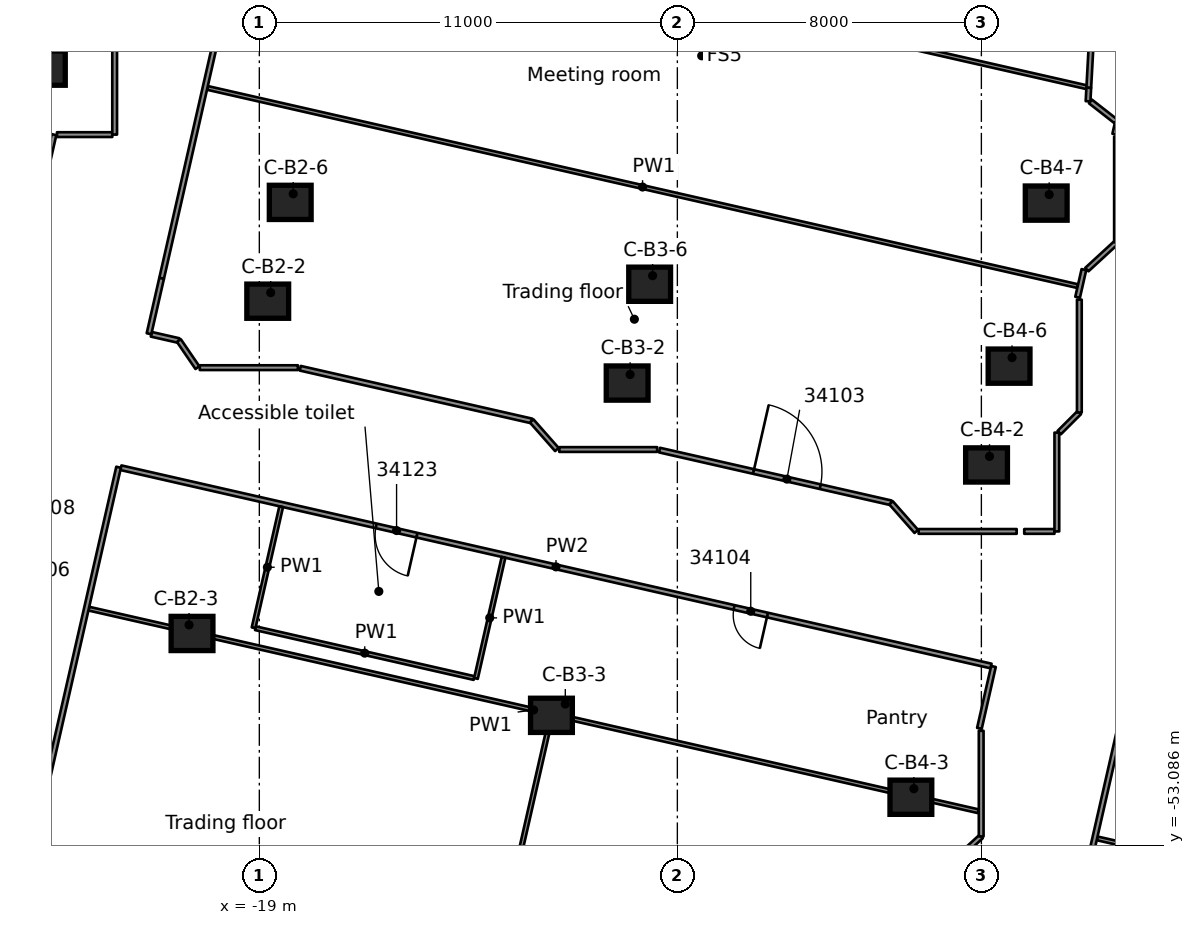
"""IFC4 building model, lengths in metres.
Left out: names, types, materials, properties, quantities, classifications, styles, units other than length and angle.
Written with IfcOpenShell. Run it as: python <this file> out.ifc"""

import sys

from ifc_helpers import new_model, si_unit, direction, frame, frame_2d, origin, origin_2d, place, context, subcontext, project, spatial, rectangle, extrude, element, fill, save


model = new_model("IFC4")
c1 = context("Model", 3, precision=1e-05, world=origin(), true_north=direction((0.0, 1.0)))
c2 = subcontext(c1, "Body", "Model", "MODEL_VIEW")
j1 = project(units=[si_unit("LENGTHUNIT", "METRE"), si_unit("PLANEANGLEUNIT", "RADIAN")], contexts=[c1])
p1 = place(None, origin())
s1 = spatial("IfcSite", under=j1, at=p1, CompositionType="ELEMENT")
p2 = place(p1, origin())
s2 = spatial("IfcBuilding", under=s1, at=p2, CompositionType="ELEMENT")
p3 = place(p2, frame((0.0, 0.0, 167.1)))
s3 = spatial("IfcBuildingStorey", under=s2, at=p3, CompositionType="ELEMENT", Elevation=167.1)
for number, where, z_axis, x_axis in (
    (1, (-24.657, -32.632, 0.0), (0.0, 0.0, 1.0), (1.0, 0.0, 0.0)),
    (2, (-18.779, -38.764, 0.0), (0.0, 0.0, 1.0), (1.0, 0.0, 0.0)),
    (3, (-20.771, -47.507, 0.0), (0.0, 0.0, 1.0), (1.0, 0.0, 0.0)),
    (4, (-18.187, -36.164, 0.0), (0.0, 0.0, 1.0), (1.0, 0.0, 0.0)),
    (5, (-9.321, -40.918, 0.0), (0.0, 0.0, 1.0), (1.0, 0.0, 0.0)),
    (6, (-11.313, -49.661, 0.0), (0.0, 0.0, 1.0), (1.0, 0.0, 0.0)),
    (7, (-8.729, -38.318, 0.0), (0.0, 0.0, 1.0), (1.0, 0.0, 0.0)),
    (8, (0.136, -43.073, 0.0), (0.0, 0.0, 1.0), (1.0, 0.0, 0.0)),
    (9, (-1.855, -51.816, 0.0), (0.0, 0.0, 1.0), (1.0, 0.0, 0.0)),
    (10, (0.729, -40.473, 0.0), (0.0, 0.0, 1.0), (1.0, 0.0, 0.0)),
    (11, (1.706, -36.183, 0.0), (0.0, 0.0, 1.0), (1.0, 0.0, 0.0)),
):
    element("IfcColumn", number, at=place(p3, frame(where, z_axis=z_axis, x_axis=x_axis)), inside=s3, PredefinedType="COLUMN", context=c2, shape_type="SweptSolid", body=[
        extrude(rectangle(XDim=1.1, YDim=0.9, at=origin_2d()), origin(), (0.0, 0.0, 1.0), 3.5),
    ])
p4 = place(p3, frame((-23.487, -46.854, 0.0), z_axis=(0.0, 0.0, 1.0), x_axis=(0.975033161008, -0.222059304997, 0.0)))
e12 = element("IfcWall", 12, at=p4, inside=s3, PredefinedType="PARTITIONING", context=c2, shape_type="SweptSolid", body=[
    extrude(rectangle(XDim=24.007, YDim=0.1, at=frame_2d((12.004, 0.0))), origin(), (0.0, 0.0, 1.0), 3.06),
])
p5 = place(p3, frame((3.046, -52.898, 0.0), z_axis=(0.0, 0.0, 1.0), x_axis=(0.975003485187, -0.222189567426, 0.0)))
e13 = element("IfcWall", 13, at=p5, inside=s3, PredefinedType="PARTITIONING", context=c2, shape_type="SweptSolid", body=[
    extrude(rectangle(XDim=5.531, YDim=0.1, at=frame_2d((2.766, 0.0))), origin(), (0.0, 0.0, 1.0), 3.06),
])
p6 = place(p3, frame((-19.102, -47.369, 0.0), z_axis=(0.0, 0.0, 1.0), x_axis=(0.974994450255, -0.222229210436, 0.0)))
e14 = element("IfcWall", 14, at=p6, inside=s3, PredefinedType="PARTITIONING", context=c2, shape_type="SweptSolid", body=[
    extrude(rectangle(XDim=5.899, YDim=0.1, at=frame_2d((2.95, 0.0))), origin(), (0.0, 0.0, 1.0), 3.06),
])
p7 = place(p3, frame((0.255, -48.363, 0.0), z_axis=(0.0, 0.0, 1.0), x_axis=(-0.975011387461, 0.222154888135, 0.0)))
e15 = element("IfcWall", 15, at=p7, inside=s3, PredefinedType="PARTITIONING", context=c2, shape_type="SweptSolid", body=[
    extrude(rectangle(XDim=23.484, YDim=0.125, at=frame_2d((11.742, 0.0))), origin(), (0.0, 0.0, 1.0), 3.06),
])
p8 = place(p7, frame((6.036, 0.0, 0.0)))
e16 = element("IfcOpeningElement", 16, at=p8, cuts=e15, PredefinedType="OPENING", context=c2, shape_type="SweptSolid", body=[
    extrude(rectangle(XDim=0.9, YDim=2.1, at=frame_2d((0.45, 1.05))), frame((0.0, 0.073, 0.0), z_axis=(0.0, -1.0, 0.0), x_axis=(1.0, 0.0, 0.0)), (0.0, 0.0, 1.0), 0.145),
])
p9 = place(p7, frame((15.494, 0.0, 0.0)))
e17 = element("IfcOpeningElement", 17, at=p9, cuts=e15, PredefinedType="OPENING", context=c2, shape_type="SweptSolid", body=[
    extrude(rectangle(XDim=1.1, YDim=2.1, at=frame_2d((0.55, 1.05))), frame((0.0, 0.073, 0.0), z_axis=(0.0, -1.0, 0.0), x_axis=(1.0, 0.0, 0.0)), (0.0, 0.0, 1.0), 0.145),
])
p10 = place(p3, frame((-21.842, -39.635, 0.0), z_axis=(0.0, 0.0, 1.0), x_axis=(0.975061856112, -0.221933270953, 0.0)))
e18 = element("IfcWall", 18, at=p10, inside=s3, PredefinedType="PARTITIONING", context=c2, shape_type="SweptSolid", body=[
    extrude(rectangle(XDim=0.744, YDim=0.125, at=frame_2d((0.372, 0.0))), origin(), (0.0, 0.0, 1.0), 3.06),
])
p11 = place(p3, frame((-17.924, -40.528, 0.0), z_axis=(0.0, 0.0, 1.0), x_axis=(0.975041788435, -0.2220214197, 0.0)))
e19 = element("IfcWall", 19, at=p11, inside=s3, PredefinedType="PARTITIONING", context=c2, shape_type="SweptSolid", body=[
    extrude(rectangle(XDim=6.247, YDim=0.125, at=frame_2d((3.124, 0.0))), origin(), (0.0, 0.0, 1.0), 3.06),
])
p12 = place(p3, frame((-8.469, -42.682, 0.0), z_axis=(0.0, 0.0, 1.0), x_axis=(0.975041034041, -0.222024732714, 0.0)))
e20 = element("IfcWall", 20, at=p12, inside=s3, PredefinedType="PARTITIONING", context=c2, shape_type="SweptSolid", body=[
    extrude(rectangle(XDim=6.248, YDim=0.125, at=frame_2d((3.124, 0.0))), origin(), (0.0, 0.0, 1.0), 3.06),
])
p13 = place(p12, frame((2.538, 0.0, 0.0)))
e21 = element("IfcOpeningElement", 21, at=p13, cuts=e20, PredefinedType="OPENING", context=c2, shape_type="SweptSolid", body=[
    extrude(rectangle(XDim=1.8, YDim=2.1, at=frame_2d((0.9, 1.05))), frame((0.0, 0.073, 0.0), z_axis=(0.0, -1.0, 0.0), x_axis=(1.0, 0.0, 0.0)), (0.0, 0.0, 1.0), 0.145),
])
p14 = place(p3, frame((-20.366, -33.152, 0.0), z_axis=(0.0, 0.0, 1.0), x_axis=(0.975030849226, -0.222069455479, 0.0)))
e22 = element("IfcWall", 22, at=p14, inside=s3, PredefinedType="PARTITIONING", context=c2, shape_type="SweptSolid", body=[
    extrude(rectangle(XDim=23.487, YDim=0.1, at=frame_2d((11.744, 0.0))), origin(), (0.0, 0.0, 1.0), 3.06),
])
p15 = place(p3, frame((-19.221, -28.127, 0.0), z_axis=(0.0, 0.0, 1.0), x_axis=(0.975047400712, -0.22199677107, 0.0)))
e23 = element("IfcWall", 23, at=p15, inside=s3, PredefinedType="PARTITIONING", context=c2, shape_type="SweptSolid", body=[
    extrude(rectangle(XDim=22.555, YDim=0.1, at=frame_2d((11.277, 0.0))), origin(), (0.0, 0.0, 1.0), 3.06),
])
p16 = place(p3, frame((2.869, -33.508, 0.0), z_axis=(0.0, 0.0, 1.0), x_axis=(0.787979198173, -0.615701862306, 0.0)))
e24 = element("IfcWall", 24, at=p16, inside=s3, PredefinedType="PARTITIONING", context=c2, shape_type="SweptSolid", body=[
    extrude(rectangle(XDim=0.901, YDim=0.125, at=frame_2d((0.451, 0.0))), origin(), (0.0, 0.0, 1.0), 3.06),
])
p17 = place(p3, frame((-0.785, -53.565, 0.0), z_axis=(0.0, 0.0, 1.0), x_axis=(0.736206501859, 0.676756962742, 0.0)))
e25 = element("IfcWall", 25, at=p17, inside=s3, PredefinedType="PARTITIONING", context=c2, shape_type="SweptSolid", body=[
    extrude(rectangle(XDim=1.06, YDim=0.125, at=frame_2d((0.53, 0.0))), origin(), (0.0, 0.0, 1.0), 3.06),
])
p18 = place(p3, frame((-1.651, -44.822, 0.0), z_axis=(0.0, 0.0, 1.0), x_axis=(1.0, 0.0, 0.0)))
e26 = element("IfcWall", 26, at=p18, inside=s3, PredefinedType="PARTITIONING", context=c2, shape_type="SweptSolid", body=[
    extrude(rectangle(XDim=2.58, YDim=0.125, at=frame_2d((1.29, 0.0))), origin(), (0.0, 0.0, 1.0), 3.06),
])
p19 = place(p3, frame((1.128, -44.822, 0.0), z_axis=(0.0, 0.0, 1.0), x_axis=(1.0, 0.0, 0.0)))
e27 = element("IfcWall", 27, at=p19, inside=s3, PredefinedType="PARTITIONING", context=c2, shape_type="SweptSolid", body=[
    extrude(rectangle(XDim=0.795, YDim=0.125, at=frame_2d((0.397, 0.0))), origin(), (0.0, 0.0, 1.0), 3.06),
])
p20 = place(p3, frame((-11.107, -42.667, 0.0), z_axis=(0.0, 0.0, 1.0), x_axis=(1.0, 0.0, 0.0)))
e28 = element("IfcWall", 28, at=p20, inside=s3, PredefinedType="PARTITIONING", context=c2, shape_type="SweptSolid", body=[
    extrude(rectangle(XDim=2.576, YDim=0.125, at=frame_2d((1.288, 0.0))), origin(), (0.0, 0.0, 1.0), 3.06),
])
p21 = place(p3, frame((2.048, -42.222, 0.0), z_axis=(0.0, 0.0, 1.0), x_axis=(0.707758792556, 0.706454168053, 0.0)))
e29 = element("IfcWall", 29, at=p21, inside=s3, PredefinedType="PARTITIONING", context=c2, shape_type="SweptSolid", body=[
    extrude(rectangle(XDim=0.749, YDim=0.125, at=frame_2d((0.374, 0.0))), origin(), (0.0, 0.0, 1.0), 3.06),
])
p22 = place(p3, frame((-20.567, -40.513, 0.0), z_axis=(0.0, 0.0, 1.0), x_axis=(1.0, 0.0, 0.0)))
e30 = element("IfcWall", 30, at=p22, inside=s3, PredefinedType="PARTITIONING", context=c2, shape_type="SweptSolid", body=[
    extrude(rectangle(XDim=2.582, YDim=0.125, at=frame_2d((1.291, 0.0))), origin(), (0.0, 0.0, 1.0), 3.06),
])
p23 = place(p3, frame((2.776, -37.932, 0.0), z_axis=(0.0, 0.0, 1.0), x_axis=(0.736321314263, 0.676632043404, 0.0)))
e31 = element("IfcWall", 31, at=p23, inside=s3, PredefinedType="PARTITIONING", context=c2, shape_type="SweptSolid", body=[
    extrude(rectangle(XDim=1.059, YDim=0.125, at=frame_2d((0.53, 0.0))), origin(), (0.0, 0.0, 1.0), 3.06),
])
p24 = place(p3, frame((-24.325, -34.381, 0.0), z_axis=(0.0, 0.0, 1.0), x_axis=(1.0, 0.0, 0.0)))
e32 = element("IfcWall", 32, at=p24, inside=s3, PredefinedType="PARTITIONING", context=c2, shape_type="SweptSolid", body=[
    extrude(rectangle(XDim=1.456, YDim=0.125, at=frame_2d((0.728, 0.0))), origin(), (0.0, 0.0, 1.0), 3.06),
])
p25 = place(p3, frame((2.532, -38.661, 0.0), z_axis=(0.0, 0.0, 1.0), x_axis=(0.222398515533, 0.974955845302, 0.0)))
e33 = element("IfcWall", 33, at=p25, inside=s3, PredefinedType="PARTITIONING", context=c2, shape_type="SweptSolid", body=[
    extrude(rectangle(XDim=0.747, YDim=0.125, at=frame_2d((0.373, 0.0))), origin(), (0.0, 0.0, 1.0), 3.06),
])
p26 = place(p3, frame((4.962, -44.211, 0.0), z_axis=(0.0, 0.0, 1.0), x_axis=(-0.222229868657, -0.974994300228, 0.0)))
e34 = element("IfcWall", 34, at=p26, inside=s3, PredefinedType="PARTITIONING", context=c2, shape_type="SweptSolid", body=[
    extrude(rectangle(XDim=13.918, YDim=0.125, at=frame_2d((6.959, 0.0))), origin(), (0.0, 0.0, 1.0), 3.06),
])
p27 = place(p26, frame((2.341, 0.0, 0.0)))
e35 = element("IfcOpeningElement", 35, at=p27, cuts=e34, PredefinedType="OPENING", context=c2, shape_type="SweptSolid", body=[
    extrude(rectangle(XDim=1.8, YDim=2.1, at=frame_2d((0.9, 1.05))), frame((0.0, 0.073, 0.0), z_axis=(0.0, -1.0, 0.0), x_axis=(1.0, 0.0, 0.0)), (0.0, 0.0, 1.0), 0.145),
])
p28 = place(p26, frame((10.995, 0.0, 0.0)))
e36 = element("IfcOpeningElement", 36, at=p28, cuts=e34, PredefinedType="OPENING", context=c2, shape_type="SweptSolid", body=[
    extrude(rectangle(XDim=0.9, YDim=2.1, at=frame_2d((0.45, 1.05))), frame((0.0, 0.073, 0.0), z_axis=(0.0, -1.0, 0.0), x_axis=(1.0, 0.0, 0.0)), (0.0, 0.0, 1.0), 0.145),
])
p29 = place(p3, frame((3.509, -34.372, 0.0), z_axis=(0.0, 0.0, 1.0), x_axis=(0.221088338472, 0.975253785736, 0.0)))
e37 = element("IfcWall", 37, at=p29, inside=s3, PredefinedType="PARTITIONING", context=c2, shape_type="SweptSolid", body=[
    extrude(rectangle(XDim=0.317, YDim=0.125, at=frame_2d((0.158, 0.0))), origin(), (0.0, 0.0, 1.0), 3.06),
])
p30 = place(p3, frame((-0.052, -50.005, 0.0), z_axis=(0.0, 0.0, 1.0), x_axis=(0.22157056649, 0.975144340119, 0.0)))
e38 = element("IfcWall", 38, at=p30, inside=s3, PredefinedType="PARTITIONING", context=c2, shape_type="SweptSolid", body=[
    extrude(rectangle(XDim=1.67, YDim=0.125, at=frame_2d((0.835, 0.0))), origin(), (0.0, 0.0, 1.0), 3.06),
])
p31 = place(p3, frame((-13.493, -59.233, 0.0), z_axis=(0.0, 0.0, 1.0), x_axis=(0.222147617684, 0.975013043993, 0.0)))
e39 = element("IfcWall", 39, at=p31, inside=s3, PredefinedType="PARTITIONING", context=c2, shape_type="SweptSolid", body=[
    extrude(rectangle(XDim=9.8, YDim=0.1, at=frame_2d((4.9, 0.0))), origin(), (0.0, 0.0, 1.0), 3.06),
])
p32 = place(p3, frame((-13.3, -48.691, 0.0), z_axis=(0.0, 0.0, 1.0), x_axis=(0.222066455623, 0.975031532458, 0.0)))
e40 = element("IfcWall", 40, at=p32, inside=s3, PredefinedType="PARTITIONING", context=c2, shape_type="SweptSolid", body=[
    extrude(rectangle(XDim=3.27, YDim=0.1, at=frame_2d((1.635, 0.0))), origin(), (0.0, 0.0, 1.0), 3.06),
])
p33 = place(p3, frame((-19.151, -47.358, 0.0), z_axis=(0.0, 0.0, 1.0), x_axis=(0.222060136704, 0.97503297159, 0.0)))
e41 = element("IfcWall", 41, at=p33, inside=s3, PredefinedType="PARTITIONING", context=c2, shape_type="SweptSolid", body=[
    extrude(rectangle(XDim=3.269, YDim=0.1, at=frame_2d((1.634, 0.0))), origin(), (0.0, 0.0, 1.0), 3.06),
])
p34 = place(p3, frame((-24.792, -52.3, 0.0), z_axis=(0.0, 0.0, 1.0), x_axis=(0.222197946193, 0.975001575746, 0.0)))
e42 = element("IfcWall", 42, at=p34, inside=s3, PredefinedType="PARTITIONING", context=c2, shape_type="SweptSolid", body=[
    extrude(rectangle(XDim=9.402, YDim=0.125, at=frame_2d((4.701, 0.0))), origin(), (0.0, 0.0, 1.0), 3.06),
])
p35 = place(p3, frame((-19.283, -28.115, 0.0), z_axis=(0.0, 0.0, 1.0), x_axis=(-0.222050161604, -0.975035243328, 0.0)))
e43 = element("IfcWall", 43, at=p35, inside=s3, PredefinedType="PARTITIONING", context=c2, shape_type="SweptSolid", body=[
    extrude(rectangle(XDim=10.304, YDim=0.125, at=frame_2d((5.152, 0.0))), origin(), (0.0, 0.0, 1.0), 3.06),
])
p36 = place(p35, frame((2.098, 0.0, 0.0)))
e44 = element("IfcOpeningElement", 44, at=p36, cuts=e43, PredefinedType="OPENING", context=c2, shape_type="SweptSolid", body=[
    extrude(rectangle(XDim=0.9, YDim=2.1, at=frame_2d((0.45, 1.05))), frame((0.0, 0.073, 0.0), z_axis=(0.0, -1.0, 0.0), x_axis=(1.0, 0.0, 0.0)), (0.0, 0.0, 1.0), 0.145),
])
p37 = place(p3, frame((-21.903, -39.621, 0.0), z_axis=(0.0, 0.0, 1.0), x_axis=(0.221903185503, 0.975068703356, 0.0)))
e45 = element("IfcWall", 45, at=p37, inside=s3, PredefinedType="PARTITIONING", context=c2, shape_type="SweptSolid", body=[
    extrude(rectangle(XDim=1.496, YDim=0.125, at=frame_2d((0.748, 0.0))), origin(), (0.0, 0.0, 1.0), 3.06),
])
p38 = place(p3, frame((-25.082, -37.362, 0.0), z_axis=(0.0, 0.0, 1.0), x_axis=(0.222145861705, 0.975013444075, 0.0)))
e46 = element("IfcWall", 46, at=p38, inside=s3, PredefinedType="PARTITIONING", context=c2, shape_type="SweptSolid", body=[
    extrude(rectangle(XDim=3.056, YDim=0.125, at=frame_2d((1.528, 0.0))), origin(), (0.0, 0.0, 1.0), 3.06),
])
p39 = place(p38, frame((0.6, 0.0, 0.0)))
e47 = element("IfcOpeningElement", 47, at=p39, cuts=e46, PredefinedType="OPENING", context=c2, shape_type="SweptSolid", body=[
    extrude(rectangle(XDim=1.8, YDim=2.1, at=frame_2d((0.9, 1.05))), frame((0.0, 0.073, 0.0), z_axis=(0.0, -1.0, 0.0), x_axis=(1.0, 0.0, 0.0)), (0.0, 0.0, 1.0), 0.145),
])
p40 = place(p3, frame((2.826, -33.149, 0.0), z_axis=(0.0, 0.0, 1.0), x_axis=(0.054748402429, 0.998500181488, 0.0)))
e48 = element("IfcWall", 48, at=p40, inside=s3, PredefinedType="PARTITIONING", context=c2, shape_type="SweptSolid", body=[
    extrude(rectangle(XDim=18.176, YDim=0.125, at=frame_2d((9.088, 0.0))), origin(), (0.0, 0.0, 1.0), 3.06),
])
p41 = place(p40, frame((9.059, 0.0, 0.0)))
e49 = element("IfcOpeningElement", 49, at=p41, cuts=e48, PredefinedType="OPENING", context=c2, shape_type="SweptSolid", body=[
    extrude(rectangle(XDim=0.9, YDim=2.1, at=frame_2d((0.45, 1.05))), frame((0.0, 0.073, 0.0), z_axis=(0.0, -1.0, 0.0), x_axis=(1.0, 0.0, 0.0)), (0.0, 0.0, 1.0), 0.145),
])
p42 = place(p3, frame((2.807, -33.504, 0.0), z_axis=(0.0, 0.0, 1.0), x_axis=(0.053568093203, 0.998564198933, 0.0)))
e50 = element("IfcWall", 50, at=p42, inside=s3, PredefinedType="PARTITIONING", context=c2, shape_type="SweptSolid", body=[
    extrude(rectangle(XDim=0.355, YDim=0.125, at=frame_2d((0.178, 0.0))), origin(), (0.0, 0.0, 1.0), 3.06),
])
p43 = place(p3, frame((3.556, -37.215, 0.0), z_axis=(0.0, 0.0, 1.0), x_axis=(0.0, 1.0, 0.0)))
e51 = element("IfcWall", 51, at=p43, inside=s3, PredefinedType="PARTITIONING", context=c2, shape_type="SweptSolid", body=[
    extrude(rectangle(XDim=2.782, YDim=0.125, at=frame_2d((1.391, 0.0))), origin(), (0.0, 0.0, 1.0), 3.06),
])
p44 = place(p3, frame((2.578, -41.693, 0.0), z_axis=(0.0, 0.0, 1.0), x_axis=(0.0, 1.0, 0.0)))
e52 = element("IfcWall", 52, at=p44, inside=s3, PredefinedType="PARTITIONING", context=c2, shape_type="SweptSolid", body=[
    extrude(rectangle(XDim=2.97, YDim=0.125, at=frame_2d((1.485, 0.0))), origin(), (0.0, 0.0, 1.0), 3.06),
])
p45 = place(p3, frame((1.986, -44.822, 0.0), z_axis=(0.0, 0.0, 1.0), x_axis=(0.0, 1.0, 0.0)))
e53 = element("IfcWall", 53, at=p45, inside=s3, PredefinedType="PARTITIONING", context=c2, shape_type="SweptSolid", body=[
    extrude(rectangle(XDim=2.6, YDim=0.125, at=frame_2d((1.3, 0.0))), origin(), (0.0, 0.0, 1.0), 3.06),
])
p46 = place(p3, frame((-0.005, -52.848, 0.0), z_axis=(0.0, 0.0, 1.0), x_axis=(0.0, 1.0, 0.0)))
e54 = element("IfcWall", 54, at=p46, inside=s3, PredefinedType="PARTITIONING", context=c2, shape_type="SweptSolid", body=[
    extrude(rectangle(XDim=2.781, YDim=0.125, at=frame_2d((1.391, 0.0))), origin(), (0.0, 0.0, 1.0), 3.06),
])
p47 = place(p3, frame((-1.713, -44.822, 0.0), z_axis=(0.0, 0.0, 1.0), x_axis=(-0.661460760782, 0.749979774358, 0.0)))
e55 = element("IfcWall", 55, at=p47, inside=s3, PredefinedType="PARTITIONING", context=c2, shape_type="SweptSolid", body=[
    extrude(rectangle(XDim=1.004, YDim=0.125, at=frame_2d((0.502, 0.0))), origin(), (0.0, 0.0, 1.0), 3.06),
])
p48 = place(p3, frame((-11.17, -42.667, 0.0), z_axis=(0.0, 0.0, 1.0), x_axis=(-0.66139609203, 0.750036805395, 0.0)))
e56 = element("IfcWall", 56, at=p48, inside=s3, PredefinedType="PARTITIONING", context=c2, shape_type="SweptSolid", body=[
    extrude(rectangle(XDim=1.002, YDim=0.125, at=frame_2d((0.501, 0.0))), origin(), (0.0, 0.0, 1.0), 3.06),
])
p49 = place(p3, frame((-20.629, -40.513, 0.0), z_axis=(0.0, 0.0, 1.0), x_axis=(-0.564896638824, 0.82516167352, 0.0)))
e57 = element("IfcWall", 57, at=p49, inside=s3, PredefinedType="PARTITIONING", context=c2, shape_type="SweptSolid", body=[
    extrude(rectangle(XDim=0.864, YDim=0.125, at=frame_2d((0.432, 0.0))), origin(), (0.0, 0.0, 1.0), 3.06),
])
p50 = place(p3, frame((-22.807, -34.381, 0.0), z_axis=(0.0, 0.0, 1.0), x_axis=(0.0, 1.0, 0.0)))
e58 = element("IfcWall", 58, at=p50, inside=s3, PredefinedType="PARTITIONING", context=c2, shape_type="SweptSolid", body=[
    extrude(rectangle(XDim=3.499, YDim=0.125, at=frame_2d((1.75, 0.0))), origin(), (0.0, 0.0, 1.0), 3.06),
])
p51 = place(p13, origin())
e59 = element("IfcDoor", 59, at=p51, inside=s3, OperationType="DOUBLE_DOOR_SINGLE_SWING", PredefinedType="DOOR", context=c2, shape_type="SweptSolid", body=[
    extrude(rectangle(XDim=1.8, YDim=2.1, at=frame_2d((0.9, 1.05))), frame((0.0, 0.025, 0.0), z_axis=(0.0, -1.0, 0.0), x_axis=(1.0, 0.0, 0.0)), (0.0, 0.0, 1.0), 0.05),
])
fill(e21, e59)
p52 = place(p8, origin())
e60 = element("IfcDoor", 60, at=p52, inside=s3, OperationType="SINGLE_SWING_LEFT", PredefinedType="DOOR", context=c2, shape_type="SweptSolid", body=[
    extrude(rectangle(XDim=0.9, YDim=2.1, at=frame_2d((0.45, 1.05))), frame((0.0, 0.025, 0.0), z_axis=(0.0, -1.0, 0.0), x_axis=(1.0, 0.0, 0.0)), (0.0, 0.0, 1.0), 0.05),
])
fill(e16, e60)
p53 = place(p9, origin())
e61 = element("IfcDoor", 61, at=p53, inside=s3, OperationType="SINGLE_SWING_RIGHT", PredefinedType="DOOR", context=c2, shape_type="SweptSolid", body=[
    extrude(rectangle(XDim=1.1, YDim=2.1, at=frame_2d((0.55, 1.05))), frame((0.0, 0.025, 0.0), z_axis=(0.0, -1.0, 0.0), x_axis=(1.0, 0.0, 0.0)), (0.0, 0.0, 1.0), 0.05),
])
fill(e17, e61)
save(model, sys.argv[1])
